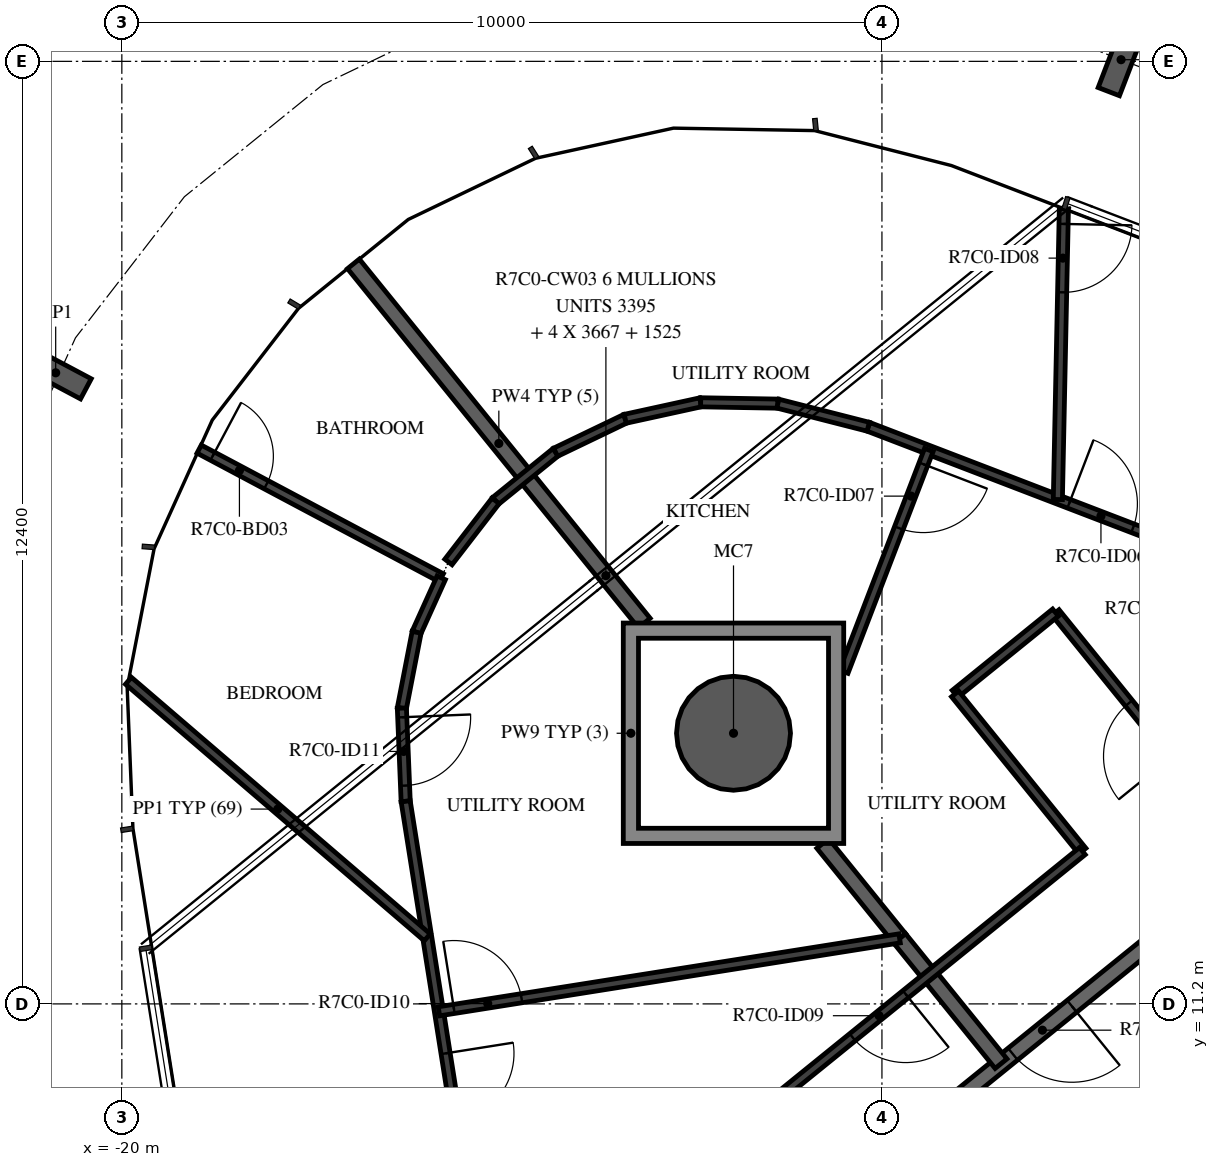
"""IFC4 building model, lengths in metres.
Left out: names, types, materials, properties, quantities, classifications, styles, units other than length and angle.
Written with IfcOpenShell. Run it as: python <this file> out.ifc"""

import sys

from ifc_helpers import new_model, si_unit, direction, frame, frame_2d, origin, origin_2d, place, context, subcontext, project, spatial, polyline, rectangle, hollow_circle, i_section, outline, extrude, element, fill, save


model = new_model("IFC4")
c1 = context("Model", 3, precision=1e-05, world=origin(), true_north=direction((0.0, 1.0)))
c2 = subcontext(c1, "Body", "Model", "MODEL_VIEW")
j1 = project(units=[si_unit("LENGTHUNIT", "METRE"), si_unit("PLANEANGLEUNIT", "RADIAN")], contexts=[c1])
p1 = place(None, origin())
s1 = spatial("IfcSite", under=j1, at=p1, CompositionType="ELEMENT")
p2 = place(p1, origin())
s2 = spatial("IfcBuilding", under=s1, at=p2, CompositionType="ELEMENT")
p3 = place(p2, frame((0.0, 0.0, 284.4)))
s3 = spatial("IfcBuildingStorey", under=s2, at=p3, CompositionType="ELEMENT", Elevation=284.4)
p4 = place(p3, frame((-11.953, 14.76, -0.38), z_axis=(0.0, 0.0, 1.0), x_axis=(1.0, 0.0, 0.0)))
e1 = element("IfcColumn", 1, at=p4, inside=s3, PredefinedType="COLUMN", context=c2, shape_type="SweptSolid", body=[
    extrude(hollow_circle(Radius=0.75, WallThickness=0.035, at=origin_2d()), origin(), (0.0, 0.0, 1.0), 3.5),
])
for number, where, z_axis, x_axis in (
    (2, (-6.854, 23.622, -0.38), (0.0, 0.0, 1.0), (0.934, -0.358, 0.0)),
    (3, (-20.87, 19.503, -0.38), (0.0, 0.0, 1.0), (0.47, 0.883, 0.0)),
):
    element("IfcColumn", number, at=place(p3, frame(where, z_axis=z_axis, x_axis=x_axis)), inside=s3, PredefinedType="COLUMN", context=c2, shape_type="SweptSolid", body=[
        extrude(i_section(OverallWidth=0.3, OverallDepth=0.9, WebThickness=0.019, FlangeThickness=0.035, FilletRadius=0.03, at=origin_2d()), origin(), (0.0, 0.0, 1.0), 3.5),
    ])
p5 = place(p3, frame((-4.51, 10.845, 0.0), z_axis=(0.0, 0.0, 1.0), x_axis=(-0.865975092491, -0.500087131594, 0.0)))
e4 = element("IfcWall", 4, at=p5, inside=s3, PredefinedType="SHEAR", context=c2, shape_type="SweptSolid", body=[
    extrude(rectangle(XDim=3.033, YDim=0.5, at=frame_2d((1.516, 0.0))), origin(), (0.0, 0.0, 1.0), 3.12),
])
p6 = place(p3, frame((-5.643, 12.673, 0.0), z_axis=(0.0, 0.0, 1.0), x_axis=(-0.777160148113, -0.629302871585, 0.0)))
e5 = element("IfcWall", 5, at=p6, inside=s3, PredefinedType="STANDARD", context=c2, shape_type="SweptSolid", body=[
    extrude(rectangle(XDim=7.181, YDim=0.2, at=frame_2d((3.59, 0.0))), origin(), (0.0, 0.0, 1.0), 3.12),
])
p7 = place(p6, frame((2.39, 0.0, 0.0)))
e6 = element("IfcOpeningElement", 6, at=p7, cuts=e5, PredefinedType="OPENING", context=c2, shape_type="SweptSolid", body=[
    extrude(rectangle(XDim=1.0, YDim=2.1, at=frame_2d((0.5, 1.05))), frame((0.0, 0.11, 0.0), z_axis=(0.0, -1.0, 0.0), x_axis=(1.0, 0.0, 0.0)), (0.0, 0.0, 1.0), 0.22),
])
p8 = place(p6, frame((5.19, 0.0, 0.0)))
e7 = element("IfcOpeningElement", 7, at=p8, cuts=e5, PredefinedType="OPENING", context=c2, shape_type="SweptSolid", body=[
    extrude(rectangle(XDim=1.0, YDim=2.1, at=frame_2d((0.5, 1.05))), frame((0.0, 0.11, 0.0), z_axis=(0.0, -1.0, 0.0), x_axis=(1.0, 0.0, 0.0)), (0.0, 0.0, 1.0), 0.22),
])
p9 = place(p3, frame((-9.768, 12.062, 0.0), z_axis=(0.0, 0.0, 1.0), x_axis=(0.629274383598, -0.777183215302, 0.0)))
e8 = element("IfcWall", 8, at=p9, inside=s3, PredefinedType="STANDARD", context=c2, shape_type="SweptSolid", body=[
    extrude(rectangle(XDim=2.121, YDim=0.2, at=frame_2d((1.061, 0.0))), origin(), (0.0, 0.0, 1.0), 3.12),
])
p10 = place(p3, frame((-10.779, 13.311, 0.0), z_axis=(0.0, 0.0, 1.0), x_axis=(0.629373100483, -0.77710327524, 0.0)))
e9 = element("IfcWall", 9, at=p10, inside=s3, PredefinedType="STANDARD", context=c2, shape_type="SweptSolid", body=[
    extrude(rectangle(XDim=1.606, YDim=0.2, at=frame_2d((0.803, 0.0))), origin(), (0.0, 0.0, 1.0), 3.12),
])
p11 = place(p3, frame((-16.953, 20.936, 0.0), z_axis=(0.0, 0.0, 1.0), x_axis=(0.629331057166, -0.777137324085, 0.0)))
e10 = element("IfcWall", 10, at=p11, inside=s3, PredefinedType="STANDARD", context=c2, shape_type="SweptSolid", body=[
    extrude(rectangle(XDim=6.08, YDim=0.2, at=frame_2d((3.04, 0.0))), origin(), (0.0, 0.0, 1.0), 3.12),
])
p12 = place(p3, frame((-5.933, 14.146, 0.0), z_axis=(0.0, 0.0, 1.0), x_axis=(-0.62930727886, 0.777156579316, 0.0)))
e11 = element("IfcWall", 11, at=p12, inside=s3, PredefinedType="PARTITIONING", context=c2, shape_type="SweptSolid", body=[
    extrude(rectangle(XDim=2.833, YDim=0.12, at=frame_2d((1.417, 0.0))), origin(), (0.0, 0.0, 1.0), 3.12),
])
p13 = place(p12, frame((0.4, 0.0, 0.0)))
e12 = element("IfcOpeningElement", 12, at=p13, cuts=e11, PredefinedType="OPENING", context=c2, shape_type="SweptSolid", body=[
    extrude(rectangle(XDim=0.9, YDim=2.1, at=frame_2d((0.45, 1.05))), frame((0.0, 0.07, 0.0), z_axis=(0.0, -1.0, 0.0), x_axis=(1.0, 0.0, 0.0)), (0.0, 0.0, 1.0), 0.14),
])
p14 = place(p3, frame((-7.717, 16.348, 0.0), z_axis=(0.0, 0.0, 1.0), x_axis=(-0.777184671515, -0.629272585103, 0.0)))
e13 = element("IfcWall", 13, at=p14, inside=s3, PredefinedType="PARTITIONING", context=c2, shape_type="SweptSolid", body=[
    extrude(rectangle(XDim=1.7, YDim=0.12, at=frame_2d((0.85, 0.0))), origin(), (0.0, 0.0, 1.0), 3.12),
])
p15 = place(p3, frame((-9.038, 15.278, 0.0), z_axis=(0.0, 0.0, 1.0), x_axis=(0.629338090938, -0.777131628037, 0.0)))
e14 = element("IfcWall", 14, at=p15, inside=s3, PredefinedType="PARTITIONING", context=c2, shape_type="SweptSolid", body=[
    extrude(rectangle(XDim=2.661, YDim=0.12, at=frame_2d((1.331, 0.0))), origin(), (0.0, 0.0, 1.0), 3.12),
])
p16 = place(p3, frame((-7.363, 13.21, 0.0), z_axis=(0.0, 0.0, 1.0), x_axis=(-0.777139504663, -0.629328364443, 0.0)))
e15 = element("IfcWall", 15, at=p16, inside=s3, PredefinedType="PARTITIONING", context=c2, shape_type="SweptSolid", body=[
    extrude(rectangle(XDim=6.584, YDim=0.12, at=frame_2d((3.292, 0.0))), origin(), (0.0, 0.0, 1.0), 3.12),
])
p17 = place(p16, frame((2.991, 0.0, 0.0)))
e16 = element("IfcOpeningElement", 16, at=p17, cuts=e15, PredefinedType="OPENING", context=c2, shape_type="SweptSolid", body=[
    extrude(rectangle(XDim=0.9, YDim=2.1, at=frame_2d((0.45, 1.05))), frame((0.0, 0.07, 0.0), z_axis=(0.0, -1.0, 0.0), x_axis=(1.0, 0.0, 0.0)), (0.0, 0.0, 1.0), 0.14),
])
p18 = place(p3, frame((-10.18, 18.793, 0.0), z_axis=(0.0, 0.0, 1.0), x_axis=(0.933574148929, -0.358384302742, 0.0)))
e17 = element("IfcWall", 17, at=p18, inside=s3, PredefinedType="PARTITIONING", context=c2, shape_type="SweptSolid", body=[
    extrude(rectangle(XDim=10.509, YDim=0.12, at=frame_2d((5.254, 0.0))), origin(), (0.0, 0.0, 1.0), 3.12),
])
p19 = place(p18, frame((2.829, 0.0, 0.0)))
e18 = element("IfcOpeningElement", 18, at=p19, cuts=e17, PredefinedType="OPENING", context=c2, shape_type="SweptSolid", body=[
    extrude(rectangle(XDim=0.9, YDim=2.1, at=frame_2d((0.45, 1.05))), frame((0.0, 0.07, 0.0), z_axis=(0.0, -1.0, 0.0), x_axis=(1.0, 0.0, 0.0)), (0.0, 0.0, 1.0), 0.14),
])
p20 = place(p3, frame((-7.606, 21.661, 0.0), z_axis=(0.0, 0.0, 1.0), x_axis=(-0.020735808663, -0.999784990005, 0.0)))
e19 = element("IfcWall", 19, at=p20, inside=s3, PredefinedType="PARTITIONING", context=c2, shape_type="SweptSolid", body=[
    extrude(rectangle(XDim=3.826, YDim=0.12, at=frame_2d((1.913, 0.0))), origin(), (0.0, 0.0, 1.0), 3.12),
])
p21 = place(p20, frame((0.2, 0.0, 0.0)))
e20 = element("IfcOpeningElement", 20, at=p21, cuts=e19, PredefinedType="OPENING", context=c2, shape_type="SweptSolid", body=[
    extrude(rectangle(XDim=0.9, YDim=2.1, at=frame_2d((0.45, 1.05))), frame((0.0, 0.07, 0.0), z_axis=(0.0, -1.0, 0.0), x_axis=(1.0, 0.0, 0.0)), (0.0, 0.0, 1.0), 0.14),
])
p22 = place(p3, frame((-9.383, 18.487, 0.0), z_axis=(0.0, 0.0, 1.0), x_axis=(-0.358340198137, -0.933591078792, 0.0)))
e21 = element("IfcWall", 21, at=p22, inside=s3, PredefinedType="PARTITIONING", context=c2, shape_type="SweptSolid", body=[
    extrude(rectangle(XDim=3.125, YDim=0.12, at=frame_2d((1.562, 0.0))), origin(), (0.0, 0.0, 1.0), 3.12),
])
p23 = place(p22, frame((0.2, 0.0, 0.0)))
e22 = element("IfcOpeningElement", 22, at=p23, cuts=e21, PredefinedType="OPENING", context=c2, shape_type="SweptSolid", body=[
    extrude(rectangle(XDim=0.9, YDim=2.1, at=frame_2d((0.45, 1.05))), frame((0.0, 0.07, 0.0), z_axis=(0.0, -1.0, 0.0), x_axis=(1.0, 0.0, 0.0)), (0.0, 0.0, 1.0), 0.14),
])
for number, where, z_axis, x_axis in (
    (23, (-15.083, 17.818, 0.0), (0.0, 0.0, 1.0), (0.777, 0.629, 0.0)),
    (24, (-14.293, 18.458, 0.0), (0.0, 0.0, 1.0), (0.901, 0.433, 0.0)),
):
    element("IfcWall", number, at=place(p3, frame(where, z_axis=z_axis, x_axis=x_axis)), inside=s3, PredefinedType="PARTITIONING", context=c2, shape_type="SweptSolid", body=[
        extrude(rectangle(XDim=1.016, YDim=0.12, at=frame_2d((0.508, 0.0))), origin(), (0.0, 0.0, 1.0), 3.12),
    ])
p24 = place(p3, frame((-13.377, 18.898, 0.0), z_axis=(0.0, 0.0, 1.0), x_axis=(0.976972067705, 0.213367239577, 0.0)))
e25 = element("IfcWall", 25, at=p24, inside=s3, PredefinedType="PARTITIONING", context=c2, shape_type="SweptSolid", body=[
    extrude(rectangle(XDim=1.016, YDim=0.12, at=frame_2d((0.508, 0.0))), origin(), (0.0, 0.0, 1.0), 3.12),
])
p25 = place(p3, frame((-12.385, 19.115, 0.0), z_axis=(0.0, 0.0, 1.0), x_axis=(0.999850255535, -0.017305100577, 0.0)))
e26 = element("IfcWall", 26, at=p25, inside=s3, PredefinedType="PARTITIONING", context=c2, shape_type="SweptSolid", body=[
    extrude(rectangle(XDim=1.016, YDim=0.12, at=frame_2d((0.508, 0.0))), origin(), (0.0, 0.0, 1.0), 3.12),
])
p26 = place(p3, frame((-11.369, 19.097, 0.0), z_axis=(0.0, 0.0, 1.0), x_axis=(0.968877104853, -0.247542230117, 0.0)))
e27 = element("IfcWall", 27, at=p26, inside=s3, PredefinedType="PARTITIONING", context=c2, shape_type="SweptSolid", body=[
    extrude(rectangle(XDim=1.227, YDim=0.12, at=frame_2d((0.613, 0.0))), origin(), (0.0, 0.0, 1.0), 3.12),
])
p27 = place(p3, frame((-15.703, 17.014, 0.0), z_axis=(0.0, 0.0, 1.0), x_axis=(0.611091802574, 0.791559731686, 0.0)))
e28 = element("IfcWall", 28, at=p27, inside=s3, PredefinedType="PARTITIONING", context=c2, shape_type="SweptSolid", body=[
    extrude(rectangle(XDim=1.016, YDim=0.12, at=frame_2d((0.508, 0.0))), origin(), (0.0, 0.0, 1.0), 3.12),
])
p28 = place(p3, frame((-18.983, 18.499, 0.0), z_axis=(0.0, 0.0, 1.0), x_axis=(0.882938650306, -0.469488380896, 0.0)))
e29 = element("IfcWall", 29, at=p28, inside=s3, PredefinedType="PARTITIONING", context=c2, shape_type="SweptSolid", body=[
    extrude(rectangle(XDim=3.607, YDim=0.12, at=frame_2d((1.804, 0.0))), origin(), (0.0, 0.0, 1.0), 2.73),
])
p29 = place(p28, frame((0.2, 0.0, 0.0)))
e30 = element("IfcOpeningElement", 30, at=p29, cuts=e29, PredefinedType="OPENING", context=c2, shape_type="SweptSolid", body=[
    extrude(rectangle(XDim=0.8, YDim=2.1, at=frame_2d((0.4, 1.05))), frame((0.0, 0.07, 0.0), z_axis=(0.0, -1.0, 0.0), x_axis=(1.0, 0.0, 0.0)), (0.0, 0.0, 1.0), 0.14),
])
p30 = place(p3, frame((-15.798, 16.805, 0.0), z_axis=(0.0, 0.0, 1.0), x_axis=(-0.411861127809, -0.911246624904, 0.0)))
e31 = element("IfcWall", 31, at=p30, inside=s3, PredefinedType="PARTITIONING", context=c2, shape_type="SweptSolid", body=[
    extrude(rectangle(XDim=0.787, YDim=0.12, at=frame_2d((0.393, 0.0))), origin(), (0.0, 0.0, 1.0), 3.12),
])
p31 = place(p3, frame((-16.122, 16.088, 0.0), z_axis=(0.0, 0.0, 1.0), x_axis=(-0.191030445301, -0.981584112019, 0.0)))
e32 = element("IfcWall", 32, at=p31, inside=s3, PredefinedType="PARTITIONING", context=c2, shape_type="SweptSolid", body=[
    extrude(rectangle(XDim=1.016, YDim=0.12, at=frame_2d((0.508, 0.0))), origin(), (0.0, 0.0, 1.0), 3.12),
])
p32 = place(p3, frame((-16.316, 15.091, 0.0), z_axis=(0.0, 0.0, 1.0), x_axis=(0.040786423131, -0.999167887639, 0.0)))
e33 = element("IfcWall", 33, at=p32, inside=s3, PredefinedType="PARTITIONING", context=c2, shape_type="SweptSolid", body=[
    extrude(rectangle(XDim=1.227, YDim=0.12, at=frame_2d((0.614, 0.0))), origin(), (0.0, 0.0, 1.0), 3.12),
])
p33 = place(p32, frame((0.12, 0.0, 0.0)))
e34 = element("IfcOpeningElement", 34, at=p33, cuts=e33, PredefinedType="OPENING", context=c2, shape_type="SweptSolid", body=[
    extrude(rectangle(XDim=0.9, YDim=2.1, at=frame_2d((0.45, 1.05))), frame((0.0, 0.07, 0.0), z_axis=(0.0, -1.0, 0.0), x_axis=(1.0, 0.0, 0.0)), (0.0, 0.0, 1.0), 0.14),
])
p34 = place(p3, frame((-16.266, 13.865, 0.0), z_axis=(0.0, 0.0, 1.0), x_axis=(0.156422690833, -0.987690205374, 0.0)))
e35 = element("IfcWall", 35, at=p34, inside=s3, PredefinedType="PARTITIONING", context=c2, shape_type="SweptSolid", body=[
    extrude(rectangle(XDim=9.482, YDim=0.12, at=frame_2d((4.741, 0.0))), origin(), (0.0, 0.0, 1.0), 3.12),
])
p35 = place(p34, frame((3.357, 0.0, 0.0)))
e36 = element("IfcOpeningElement", 36, at=p35, cuts=e35, PredefinedType="OPENING", context=c2, shape_type="SweptSolid", body=[
    extrude(rectangle(XDim=0.9, YDim=2.1, at=frame_2d((0.45, 1.05))), frame((0.0, 0.07, 0.0), z_axis=(0.0, -1.0, 0.0), x_axis=(1.0, 0.0, 0.0)), (0.0, 0.0, 1.0), 0.14),
])
p36 = place(p3, frame((-15.828, 11.102, 0.0), z_axis=(0.0, 0.0, 1.0), x_axis=(0.98768671358, 0.156444737262, 0.0)))
e37 = element("IfcWall", 37, at=p36, inside=s3, PredefinedType="PARTITIONING", context=c2, shape_type="SweptSolid", body=[
    extrude(rectangle(XDim=6.136, YDim=0.12, at=frame_2d((3.068, 0.0))), origin(), (0.0, 0.0, 1.0), 3.12),
])
p37 = place(p36, frame((0.2, 0.0, 0.0)))
e38 = element("IfcOpeningElement", 38, at=p37, cuts=e37, PredefinedType="OPENING", context=c2, shape_type="SweptSolid", body=[
    extrude(rectangle(XDim=0.9, YDim=2.1, at=frame_2d((0.45, 1.05))), frame((0.0, 0.07, 0.0), z_axis=(0.0, -1.0, 0.0), x_axis=(1.0, 0.0, 0.0)), (0.0, 0.0, 1.0), 0.14),
])
p38 = place(p3, frame((-19.913, 15.451, 0.0), z_axis=(0.0, 0.0, 1.0), x_axis=(0.758627615547, -0.651524474544, 0.0)))
e39 = element("IfcWall", 39, at=p38, inside=s3, PredefinedType="PARTITIONING", context=c2, shape_type="SweptSolid", body=[
    extrude(rectangle(XDim=5.181, YDim=0.12, at=frame_2d((2.591, 0.0))), origin(), (0.0, 0.0, 1.0), 3.12),
])
p39 = place(p3, origin())
e40 = element("IfcWall", 40, at=p39, inside=s3, PredefinedType="STANDARD", context=c2, shape_type="SweptSolid", body=[
    extrude(outline(polyline([(-10.503, 16.21), (-10.503, 13.311), (-13.403, 13.311), (-13.403, 16.21), (-10.503, 16.21)]), holes=[polyline([(-13.203, 13.51), (-10.703, 13.51), (-10.703, 16.01), (-13.203, 16.01), (-13.203, 13.51)])]), origin(), (0.0, 0.0, 1.0), 3.12),
])
p40 = place(p7, origin())
e41 = element("IfcDoor", 41, at=p40, inside=s3, OperationType="SINGLE_SWING_RIGHT", PredefinedType="DOOR", context=c2, shape_type="SweptSolid", body=[
    extrude(rectangle(XDim=1.0, YDim=2.1, at=frame_2d((0.5, 1.05))), frame((0.0, 0.025, 0.0), z_axis=(0.0, -1.0, 0.0), x_axis=(1.0, 0.0, 0.0)), (0.0, 0.0, 1.0), 0.05),
])
fill(e6, e41)
p41 = place(p13, origin())
e42 = element("IfcDoor", 42, at=p41, inside=s3, OperationType="SINGLE_SWING_RIGHT", PredefinedType="DOOR", context=c2, shape_type="SweptSolid", body=[
    extrude(rectangle(XDim=0.9, YDim=2.1, at=frame_2d((0.45, 1.05))), frame((0.0, 0.025, 0.0), z_axis=(0.0, -1.0, 0.0), x_axis=(1.0, 0.0, 0.0)), (0.0, 0.0, 1.0), 0.05),
])
fill(e12, e42)
p42 = place(p19, origin())
e43 = element("IfcDoor", 43, at=p42, inside=s3, OperationType="SINGLE_SWING_RIGHT", PredefinedType="DOOR", context=c2, shape_type="SweptSolid", body=[
    extrude(rectangle(XDim=0.9, YDim=2.1, at=frame_2d((0.45, 1.05))), frame((0.0, 0.025, 0.0), z_axis=(0.0, -1.0, 0.0), x_axis=(1.0, 0.0, 0.0)), (0.0, 0.0, 1.0), 0.05),
])
fill(e18, e43)
p43 = place(p23, origin())
e44 = element("IfcDoor", 44, at=p43, inside=s3, OperationType="SINGLE_SWING_RIGHT", PredefinedType="DOOR", context=c2, shape_type="SweptSolid", body=[
    extrude(rectangle(XDim=0.9, YDim=2.1, at=frame_2d((0.45, 1.05))), frame((0.0, 0.025, 0.0), z_axis=(0.0, -1.0, 0.0), x_axis=(1.0, 0.0, 0.0)), (0.0, 0.0, 1.0), 0.05),
])
fill(e22, e44)
p44 = place(p21, origin())
e45 = element("IfcDoor", 45, at=p44, inside=s3, OperationType="SINGLE_SWING_RIGHT", PredefinedType="DOOR", context=c2, shape_type="SweptSolid", body=[
    extrude(rectangle(XDim=0.9, YDim=2.1, at=frame_2d((0.45, 1.05))), frame((0.0, 0.025, 0.0), z_axis=(0.0, -1.0, 0.0), x_axis=(1.0, 0.0, 0.0)), (0.0, 0.0, 1.0), 0.05),
])
fill(e20, e45)
p45 = place(p17, origin())
e46 = element("IfcDoor", 46, at=p45, inside=s3, OperationType="SINGLE_SWING_LEFT", PredefinedType="DOOR", context=c2, shape_type="SweptSolid", body=[
    extrude(rectangle(XDim=0.9, YDim=2.1, at=frame_2d((0.45, 1.05))), frame((0.0, 0.025, 0.0), z_axis=(0.0, -1.0, 0.0), x_axis=(1.0, 0.0, 0.0)), (0.0, 0.0, 1.0), 0.05),
])
fill(e16, e46)
p46 = place(p37, origin())
e47 = element("IfcDoor", 47, at=p46, inside=s3, OperationType="SINGLE_SWING_LEFT", PredefinedType="DOOR", context=c2, shape_type="SweptSolid", body=[
    extrude(rectangle(XDim=0.9, YDim=2.1, at=frame_2d((0.45, 1.05))), frame((0.0, 0.025, 0.0), z_axis=(0.0, -1.0, 0.0), x_axis=(1.0, 0.0, 0.0)), (0.0, 0.0, 1.0), 0.05),
])
fill(e38, e47)
p47 = place(p33, origin())
e48 = element("IfcDoor", 48, at=p47, inside=s3, OperationType="SINGLE_SWING_RIGHT", PredefinedType="DOOR", context=c2, shape_type="SweptSolid", body=[
    extrude(rectangle(XDim=0.9, YDim=2.1, at=frame_2d((0.45, 1.05))), frame((0.0, 0.025, 0.0), z_axis=(0.0, -1.0, 0.0), x_axis=(1.0, 0.0, 0.0)), (0.0, 0.0, 1.0), 0.05),
])
fill(e34, e48)
p48 = place(p35, origin())
e49 = element("IfcDoor", 49, at=p48, inside=s3, OperationType="SINGLE_SWING_LEFT", PredefinedType="DOOR", context=c2, shape_type="SweptSolid", body=[
    extrude(rectangle(XDim=0.9, YDim=2.1, at=frame_2d((0.45, 1.05))), frame((0.0, 0.025, 0.0), z_axis=(0.0, -1.0, 0.0), x_axis=(1.0, 0.0, 0.0)), (0.0, 0.0, 1.0), 0.05),
])
fill(e36, e49)
p49 = place(p29, origin())
e50 = element("IfcDoor", 50, at=p49, inside=s3, OperationType="SINGLE_SWING_LEFT", PredefinedType="DOOR", context=c2, shape_type="SweptSolid", body=[
    extrude(rectangle(XDim=0.8, YDim=2.1, at=frame_2d((0.4, 1.05))), frame((0.0, 0.025, 0.0), z_axis=(0.0, -1.0, 0.0), x_axis=(1.0, 0.0, 0.0)), (0.0, 0.0, 1.0), 0.05),
])
fill(e30, e50)
save(model, sys.argv[1])
